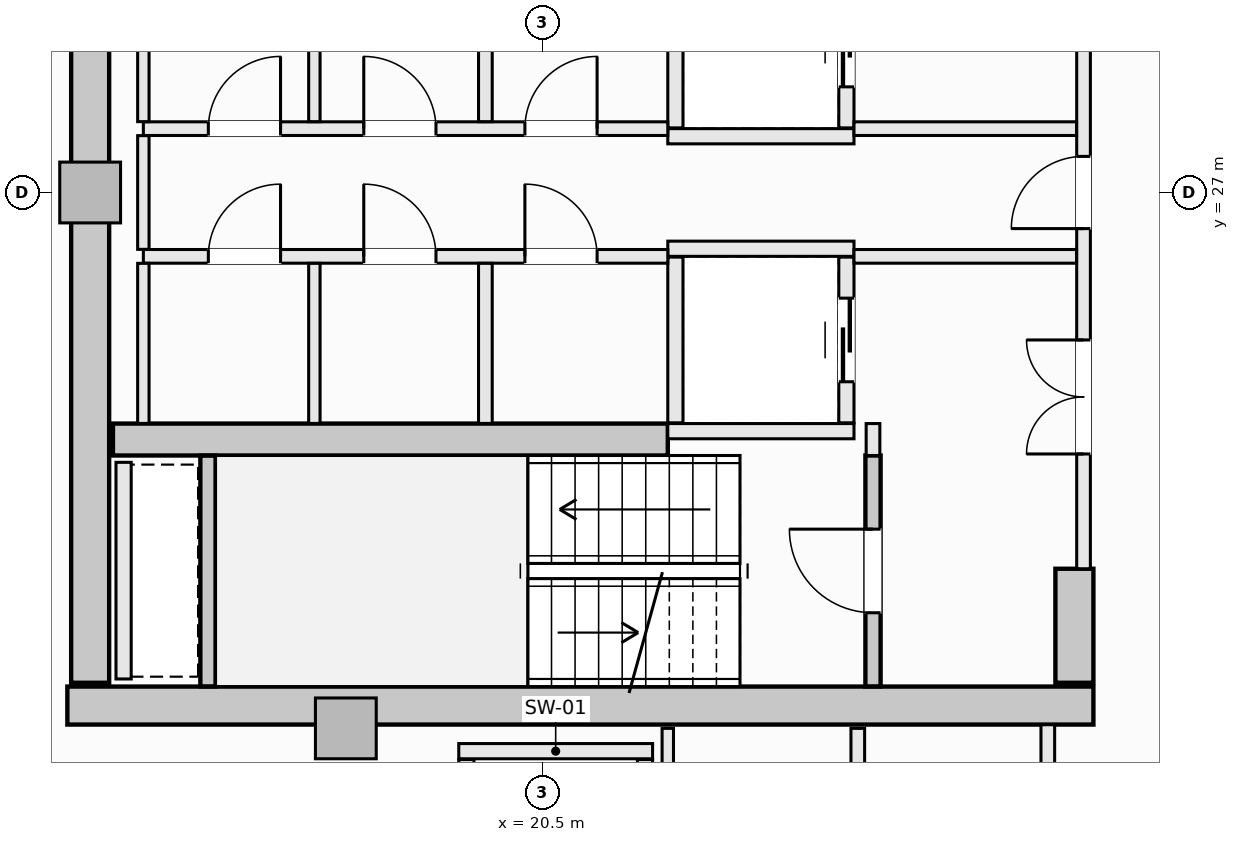
"""IFC4 building model, lengths in metres.
Left out: names, types, materials, properties, quantities, classifications, styles, units other than length and angle.
Written with IfcOpenShell. Run it as: python <this file> out.ifc"""

import sys

from ifc_helpers import new_model, si_unit, direction, frame, frame_2d, origin, origin_2d, place, context, subcontext, project, spatial, rectangle, extrude, element, fill, save


model = new_model("IFC4")
c1 = context("Model", 3, precision=1e-05, world=origin(), true_north=direction((0.0, 1.0)))
c2 = subcontext(c1, "Body", "Model", "MODEL_VIEW")
j1 = project(units=[si_unit("LENGTHUNIT", "METRE"), si_unit("PLANEANGLEUNIT", "RADIAN")], contexts=[c1])
p1 = place(None, origin())
s1 = spatial("IfcSite", under=j1, at=p1, CompositionType="ELEMENT")
p2 = place(p1, origin())
s2 = spatial("IfcBuilding", under=s1, at=p2, CompositionType="ELEMENT")
p3 = place(p2, frame((0.0, 0.0, 232.7)))
s3 = spatial("IfcBuildingStorey", under=s2, at=p3, CompositionType="ELEMENT", Elevation=232.7)
p4 = place(p3, frame((14.25, 20.25, -0.27), z_axis=(0.0, 0.0, 1.0), x_axis=(1.0, 0.0, 0.0)))
e1 = element("IfcWall", 1, at=p4, inside=s3, PredefinedType="SHEAR", context=c2, shape_type="SweptSolid", body=[
    extrude(rectangle(XDim=13.5, YDim=0.5, at=frame_2d((6.75, 0.0))), origin(), (0.0, 0.0, 1.0), 3.3),
])
p5 = place(p3, frame((14.55, 20.55, -0.27), z_axis=(0.0, 0.0, 1.0), x_axis=(0.0, 1.0, 0.0)))
e2 = element("IfcWall", 2, at=p5, inside=s3, PredefinedType="SHEAR", context=c2, shape_type="SweptSolid", body=[
    extrude(rectangle(XDim=12.9, YDim=0.5, at=frame_2d((6.45, 0.0))), origin(), (0.0, 0.0, 1.0), 3.3),
])
p6 = place(p3, frame((27.5, 20.55, -0.27), z_axis=(0.0, 0.0, 1.0), x_axis=(0.0, 1.0, 0.0)))
e3 = element("IfcWall", 3, at=p6, inside=s3, PredefinedType="SHEAR", context=c2, shape_type="SweptSolid", body=[
    extrude(rectangle(XDim=1.5, YDim=0.5, at=frame_2d((0.75, 0.0))), origin(), (0.0, 0.0, 1.0), 3.3),
])
p7 = place(p3, frame((14.85, 23.75, -0.27), z_axis=(0.0, 0.0, 1.0), x_axis=(1.0, 0.0, 0.0)))
e4 = element("IfcWall", 4, at=p7, inside=s3, PredefinedType="SHEAR", context=c2, shape_type="SweptSolid", body=[
    extrude(rectangle(XDim=7.3, YDim=0.42, at=frame_2d((3.65, 0.0))), origin(), (0.0, 0.0, 1.0), 3.3),
])
for number, where, z_axis, x_axis in (
    (5, (14.55, 27.0, -0.27), (0.0, 0.0, 1.0), (1.0, 0.0, 0.0)),
    (6, (17.914, 19.95, -0.27), (0.0, 0.0, 1.0), (1.0, 0.0, 0.0)),
):
    element("IfcColumn", number, at=place(p3, frame(where, z_axis=z_axis, x_axis=x_axis)), inside=s3, PredefinedType="PILASTER", context=c2, shape_type="SweptSolid", body=[
        extrude(rectangle(XDim=0.8, YDim=0.8, at=origin_2d()), origin(), (0.0, 0.0, 1.0), 3.3),
    ])
p8 = place(p3, frame((24.85, 20.502, -0.27), z_axis=(0.0, 0.0, 1.0), x_axis=(0.0, 1.0, 0.0)))
e7 = element("IfcWall", 7, at=p8, inside=s3, PredefinedType="SHEAR", context=c2, shape_type="SweptSolid", body=[
    extrude(rectangle(XDim=3.038, YDim=0.2, at=frame_2d((1.519, 0.0))), origin(), (0.0, 0.0, 1.0), 3.3),
])
p9 = place(p8, frame((0.969, 0.0, 0.27)))
e8 = element("IfcOpeningElement", 8, at=p9, cuts=e7, PredefinedType="OPENING", context=c2, shape_type="SweptSolid", body=[
    extrude(rectangle(XDim=1.1, YDim=2.15, at=frame_2d((0.55, 1.075))), frame((0.0, 0.11, 0.0), z_axis=(0.0, -1.0, 0.0), x_axis=(1.0, 0.0, 0.0)), (0.0, 0.0, 1.0), 0.22),
])
p10 = place(p3, frame((16.1, 20.502, -0.27), z_axis=(0.0, 0.0, 1.0), x_axis=(0.0, 1.0, 0.0)))
e9 = element("IfcWall", 9, at=p10, inside=s3, PredefinedType="SHEAR", context=c2, shape_type="SweptSolid", body=[
    extrude(rectangle(XDim=3.036, YDim=0.2, at=frame_2d((1.518, 0.0))), origin(), (0.0, 0.0, 1.0), 3.3),
])
p11 = place(p3, frame((22.15, 27.74, 0.0), z_axis=(0.0, 0.0, 1.0), x_axis=(1.0, 0.0, 0.0)))
e10 = element("IfcWall", 10, at=p11, inside=s3, PredefinedType="SOLIDWALL", context=c2, shape_type="SweptSolid", body=[
    extrude(rectangle(XDim=2.45, YDim=0.2, at=frame_2d((1.225, 0.0))), origin(), (0.0, 0.0, 1.0), 3.03),
])
p12 = place(p3, frame((22.25, 27.85, 0.0), z_axis=(0.0, 0.0, 1.0), x_axis=(0.0, 1.0, 0.0)))
e11 = element("IfcWall", 11, at=p12, inside=s3, PredefinedType="SOLIDWALL", context=c2, shape_type="SweptSolid", body=[
    extrude(rectangle(XDim=2.18, YDim=0.2, at=frame_2d((1.09, 0.0))), origin(), (0.0, 0.0, 1.0), 3.03),
])
p13 = place(p3, frame((24.5, 27.85, 0.0), z_axis=(0.0, 0.0, 1.0), x_axis=(0.0, 1.0, 0.0)))
e12 = element("IfcWall", 12, at=p13, inside=s3, PredefinedType="SOLIDWALL", context=c2, shape_type="SweptSolid", body=[
    extrude(rectangle(XDim=2.18, YDim=0.2, at=frame_2d((1.09, 0.0))), origin(), (0.0, 0.0, 1.0), 3.03),
])
p14 = place(p13, frame((0.54, 0.0, 0.0)))
e13 = element("IfcOpeningElement", 13, at=p14, cuts=e12, PredefinedType="OPENING", context=c2, shape_type="SweptSolid", body=[
    extrude(rectangle(XDim=1.1, YDim=2.2, at=frame_2d((0.55, 1.1))), frame((0.0, 0.11, 0.0), z_axis=(0.0, -1.0, 0.0), x_axis=(1.0, 0.0, 0.0)), (0.0, 0.0, 1.0), 0.22),
])
for number, where, z_axis, x_axis in (
    (14, (22.15, 26.26, 0.0), (0.0, 0.0, 1.0), (1.0, 0.0, 0.0)),
    (15, (22.15, 23.86, 0.0), (0.0, 0.0, 1.0), (1.0, 0.0, 0.0)),
):
    element("IfcWall", number, at=place(p3, frame(where, z_axis=z_axis, x_axis=x_axis)), inside=s3, PredefinedType="SOLIDWALL", context=c2, shape_type="SweptSolid", body=[
        extrude(rectangle(XDim=2.45, YDim=0.2, at=frame_2d((1.225, 0.0))), origin(), (0.0, 0.0, 1.0), 3.03),
    ])
p15 = place(p3, frame((22.25, 23.97, 0.0), z_axis=(0.0, 0.0, 1.0), x_axis=(0.0, 1.0, 0.0)))
e16 = element("IfcWall", 16, at=p15, inside=s3, PredefinedType="SOLIDWALL", context=c2, shape_type="SweptSolid", body=[
    extrude(rectangle(XDim=2.18, YDim=0.2, at=frame_2d((1.09, 0.0))), origin(), (0.0, 0.0, 1.0), 3.03),
])
p16 = place(p3, frame((24.5, 23.97, 0.0), z_axis=(0.0, 0.0, 1.0), x_axis=(0.0, 1.0, 0.0)))
e17 = element("IfcWall", 17, at=p16, inside=s3, PredefinedType="SOLIDWALL", context=c2, shape_type="SweptSolid", body=[
    extrude(rectangle(XDim=2.18, YDim=0.2, at=frame_2d((1.09, 0.0))), origin(), (0.0, 0.0, 1.0), 3.03),
])
p17 = place(p16, frame((0.54, 0.0, 0.0)))
e18 = element("IfcOpeningElement", 18, at=p17, cuts=e17, PredefinedType="OPENING", context=c2, shape_type="SweptSolid", body=[
    extrude(rectangle(XDim=1.1, YDim=2.2, at=frame_2d((0.55, 1.1))), frame((0.0, 0.11, 0.0), z_axis=(0.0, -1.0, 0.0), x_axis=(1.0, 0.0, 0.0)), (0.0, 0.0, 1.0), 0.22),
])
p18 = place(p3, frame((19.4, 19.65, 0.0), z_axis=(0.0, 0.0, 1.0), x_axis=(1.0, 0.0, 0.0)))
e19 = element("IfcWall", 19, at=p18, inside=s3, PredefinedType="SOLIDWALL", context=c2, shape_type="SweptSolid", body=[
    extrude(rectangle(XDim=2.55, YDim=0.2, at=frame_2d((1.275, 0.0))), origin(), (0.0, 0.0, 1.0), 3.03),
])
for number, where, z_axis, x_axis in (
    (20, (19.5, 17.01, 0.0), (0.0, 0.0, 1.0), (0.0, 1.0, 0.0)),
    (21, (21.85, 17.01, 0.0), (0.0, 0.0, 1.0), (0.0, 1.0, 0.0)),
):
    element("IfcWall", number, at=place(p3, frame(where, z_axis=z_axis, x_axis=x_axis)), inside=s3, PredefinedType="SOLIDWALL", context=c2, shape_type="SweptSolid", body=[
        extrude(rectangle(XDim=2.53, YDim=0.2, at=frame_2d((1.265, 0.0))), origin(), (0.0, 0.0, 1.0), 3.03),
    ])
p19 = place(p3, frame((14.99, 20.6, 0.0), z_axis=(0.0, 0.0, 1.0), x_axis=(0.0, 1.0, 0.0)))
e22 = element("IfcWall", 22, at=p19, inside=s3, PredefinedType="SOLIDWALL", context=c2, shape_type="SweptSolid", body=[
    extrude(rectangle(XDim=2.85, YDim=0.2, at=frame_2d((1.425, 0.0))), origin(), (0.0, 0.0, 1.0), 3.03),
])
p20 = place(p3, frame((24.85, 23.54, 0.0), z_axis=(0.0, 0.0, 1.0), x_axis=(0.0, 1.0, 0.0)))
e23 = element("IfcWall", 23, at=p20, inside=s3, PredefinedType="SOLIDWALL", context=c2, shape_type="SweptSolid", body=[
    extrude(rectangle(XDim=0.42, YDim=0.18, at=frame_2d((0.21, 0.0))), origin(), (0.0, 0.0, 1.0), 3.03),
])
p21 = place(p3, frame((27.62, 22.05, 0.0), z_axis=(0.0, 0.0, 1.0), x_axis=(0.0, 1.0, 0.0)))
e24 = element("IfcWall", 24, at=p21, inside=s3, PredefinedType="SOLIDWALL", context=c2, shape_type="SweptSolid", body=[
    extrude(rectangle(XDim=9.9, YDim=0.18, at=frame_2d((4.95, 0.0))), origin(), (0.0, 0.0, 1.0), 3.03),
])
p22 = place(p21, frame((4.475, 0.0, 0.0)))
e25 = element("IfcOpeningElement", 25, at=p22, cuts=e24, PredefinedType="OPENING", context=c2, shape_type="SweptSolid", body=[
    extrude(rectangle(XDim=0.95, YDim=2.1, at=frame_2d((0.475, 1.05))), frame((0.0, 0.1, 0.0), z_axis=(0.0, -1.0, 0.0), x_axis=(1.0, 0.0, 0.0)), (0.0, 0.0, 1.0), 0.2),
])
p23 = place(p21, frame((6.89, 0.0, 0.0)))
e26 = element("IfcOpeningElement", 26, at=p23, cuts=e24, PredefinedType="OPENING", context=c2, shape_type="SweptSolid", body=[
    extrude(rectangle(XDim=1.5, YDim=2.2, at=frame_2d((0.75, 1.1))), frame((0.0, 0.1, 0.0), z_axis=(0.0, -1.0, 0.0), x_axis=(1.0, 0.0, 0.0)), (0.0, 0.0, 1.0), 0.2),
])
p24 = place(p21, frame((1.51, 0.0, 0.0)))
e27 = element("IfcOpeningElement", 27, at=p24, cuts=e24, PredefinedType="OPENING", context=c2, shape_type="SweptSolid", body=[
    extrude(rectangle(XDim=1.5, YDim=2.2, at=frame_2d((0.75, 1.1))), frame((0.0, 0.1, 0.0), z_axis=(0.0, -1.0, 0.0), x_axis=(1.0, 0.0, 0.0)), (0.0, 0.0, 1.0), 0.2),
])
p25 = place(p3, frame((15.25, 27.84, 0.0), z_axis=(0.0, 0.0, 1.0), x_axis=(1.0, 0.0, 0.0)))
e28 = element("IfcWall", 28, at=p25, inside=s3, PredefinedType="SOLIDWALL", context=c2, shape_type="SweptSolid", body=[
    extrude(rectangle(XDim=6.9, YDim=0.18, at=frame_2d((3.45, 0.0))), origin(), (0.0, 0.0, 1.0), 3.03),
])
p26 = place(p25, frame((5.02, 0.0, 0.0)))
e29 = element("IfcOpeningElement", 29, at=p26, cuts=e28, PredefinedType="OPENING", context=c2, shape_type="SweptSolid", body=[
    extrude(rectangle(XDim=0.95, YDim=2.1, at=frame_2d((0.475, 1.05))), frame((0.0, 0.1, 0.0), z_axis=(0.0, -1.0, 0.0), x_axis=(1.0, 0.0, 0.0)), (0.0, 0.0, 1.0), 0.2),
])
p27 = place(p25, frame((0.855, 0.0, 0.0)))
e30 = element("IfcOpeningElement", 30, at=p27, cuts=e28, PredefinedType="OPENING", context=c2, shape_type="SweptSolid", body=[
    extrude(rectangle(XDim=0.95, YDim=2.1, at=frame_2d((0.475, 1.05))), frame((0.0, 0.1, 0.0), z_axis=(0.0, -1.0, 0.0), x_axis=(1.0, 0.0, 0.0)), (0.0, 0.0, 1.0), 0.2),
])
p28 = place(p25, frame((2.9, 0.0, 0.0)))
e31 = element("IfcOpeningElement", 31, at=p28, cuts=e28, PredefinedType="OPENING", context=c2, shape_type="SweptSolid", body=[
    extrude(rectangle(XDim=0.95, YDim=2.1, at=frame_2d((0.475, 1.05))), frame((0.0, 0.1, 0.0), z_axis=(0.0, -1.0, 0.0), x_axis=(1.0, 0.0, 0.0)), (0.0, 0.0, 1.0), 0.2),
])
p29 = place(p3, frame((24.6, 27.84, 0.0), z_axis=(0.0, 0.0, 1.0), x_axis=(1.0, 0.0, 0.0)))
e32 = element("IfcWall", 32, at=p29, inside=s3, PredefinedType="SOLIDWALL", context=c2, shape_type="SweptSolid", body=[
    extrude(rectangle(XDim=2.928, YDim=0.18, at=frame_2d((1.464, 0.0))), origin(), (0.0, 0.0, 1.0), 3.03),
])
p30 = place(p3, frame((15.25, 26.16, 0.0), z_axis=(0.0, 0.0, 1.0), x_axis=(1.0, 0.0, 0.0)))
e33 = element("IfcWall", 33, at=p30, inside=s3, PredefinedType="SOLIDWALL", context=c2, shape_type="SweptSolid", body=[
    extrude(rectangle(XDim=6.9, YDim=0.18, at=frame_2d((3.45, 0.0))), origin(), (0.0, 0.0, 1.0), 3.03),
])
p31 = place(p30, frame((5.02, 0.0, 0.0)))
e34 = element("IfcOpeningElement", 34, at=p31, cuts=e33, PredefinedType="OPENING", context=c2, shape_type="SweptSolid", body=[
    extrude(rectangle(XDim=0.95, YDim=2.1, at=frame_2d((0.475, 1.05))), frame((0.0, 0.1, 0.0), z_axis=(0.0, -1.0, 0.0), x_axis=(1.0, 0.0, 0.0)), (0.0, 0.0, 1.0), 0.2),
])
p32 = place(p30, frame((0.855, 0.0, 0.0)))
e35 = element("IfcOpeningElement", 35, at=p32, cuts=e33, PredefinedType="OPENING", context=c2, shape_type="SweptSolid", body=[
    extrude(rectangle(XDim=0.95, YDim=2.1, at=frame_2d((0.475, 1.05))), frame((0.0, 0.1, 0.0), z_axis=(0.0, -1.0, 0.0), x_axis=(1.0, 0.0, 0.0)), (0.0, 0.0, 1.0), 0.2),
])
p33 = place(p30, frame((2.9, 0.0, 0.0)))
e36 = element("IfcOpeningElement", 36, at=p33, cuts=e33, PredefinedType="OPENING", context=c2, shape_type="SweptSolid", body=[
    extrude(rectangle(XDim=0.95, YDim=2.1, at=frame_2d((0.475, 1.05))), frame((0.0, 0.1, 0.0), z_axis=(0.0, -1.0, 0.0), x_axis=(1.0, 0.0, 0.0)), (0.0, 0.0, 1.0), 0.2),
])
p34 = place(p3, frame((24.6, 26.16, 0.0), z_axis=(0.0, 0.0, 1.0), x_axis=(1.0, 0.0, 0.0)))
e37 = element("IfcWall", 37, at=p34, inside=s3, PredefinedType="SOLIDWALL", context=c2, shape_type="SweptSolid", body=[
    extrude(rectangle(XDim=2.928, YDim=0.18, at=frame_2d((1.464, 0.0))), origin(), (0.0, 0.0, 1.0), 3.03),
])
p35 = place(p3, frame((15.25, 23.962, 0.0), z_axis=(0.0, 0.0, 1.0), x_axis=(0.0, 1.0, 0.0)))
e38 = element("IfcWall", 38, at=p35, inside=s3, PredefinedType="PARTITIONING", context=c2, shape_type="SweptSolid", body=[
    extrude(rectangle(XDim=2.106, YDim=0.15, at=frame_2d((1.053, 0.0))), origin(), (0.0, 0.0, 1.0), 3.03),
])
p36 = place(p3, frame((15.25, 26.252, 0.0), z_axis=(0.0, 0.0, 1.0), x_axis=(0.0, 1.0, 0.0)))
e39 = element("IfcWall", 39, at=p36, inside=s3, PredefinedType="PARTITIONING", context=c2, shape_type="SweptSolid", body=[
    extrude(rectangle(XDim=1.496, YDim=0.15, at=frame_2d((0.748, 0.0))), origin(), (0.0, 0.0, 1.0), 3.03),
])
p37 = place(p3, frame((15.25, 27.932, 0.0), z_axis=(0.0, 0.0, 1.0), x_axis=(0.0, 1.0, 0.0)))
e40 = element("IfcWall", 40, at=p37, inside=s3, PredefinedType="PARTITIONING", context=c2, shape_type="SweptSolid", body=[
    extrude(rectangle(XDim=2.106, YDim=0.15, at=frame_2d((1.053, 0.0))), origin(), (0.0, 0.0, 1.0), 3.03),
])
for number, where, z_axis, x_axis in (
    (41, (19.75, 23.962, 0.0), (0.0, 0.0, 1.0), (0.0, 1.0, 0.0)),
    (42, (19.75, 27.932, 0.0), (0.0, 0.0, 1.0), (0.0, 1.0, 0.0)),
):
    element("IfcWall", number, at=place(p3, frame(where, z_axis=z_axis, x_axis=x_axis)), inside=s3, PredefinedType="SOLIDWALL", context=c2, shape_type="SweptSolid", body=[
        extrude(rectangle(XDim=2.106, YDim=0.18, at=frame_2d((1.053, 0.0))), origin(), (0.0, 0.0, 1.0), 3.03),
    ])
for number, where, z_axis, x_axis in (
    (43, (17.5, 23.962, 0.0), (0.0, 0.0, 1.0), (0.0, 1.0, 0.0)),
    (44, (17.5, 27.932, 0.0), (0.0, 0.0, 1.0), (0.0, 1.0, 0.0)),
):
    element("IfcWall", number, at=place(p3, frame(where, z_axis=z_axis, x_axis=x_axis)), inside=s3, PredefinedType="PARTITIONING", context=c2, shape_type="SweptSolid", body=[
        extrude(rectangle(XDim=2.106, YDim=0.15, at=frame_2d((1.053, 0.0))), origin(), (0.0, 0.0, 1.0), 3.03),
    ])
p38 = place(p3, frame((22.15, 17.142, 0.0), z_axis=(0.0, 0.0, 1.0), x_axis=(0.0, 1.0, 0.0)))
e45 = element("IfcWall", 45, at=p38, inside=s3, PredefinedType="PARTITIONING", context=c2, shape_type="SweptSolid", body=[
    extrude(rectangle(XDim=2.808, YDim=0.15, at=frame_2d((1.404, 0.0))), origin(), (0.0, 0.0, 1.0), 3.03),
])
p39 = place(p3, frame((24.65, 17.142, 0.0), z_axis=(0.0, 0.0, 1.0), x_axis=(0.0, 1.0, 0.0)))
e46 = element("IfcWall", 46, at=p39, inside=s3, PredefinedType="SOLIDWALL", context=c2, shape_type="SweptSolid", body=[
    extrude(rectangle(XDim=2.808, YDim=0.18, at=frame_2d((1.404, 0.0))), origin(), (0.0, 0.0, 1.0), 3.03),
])
p40 = place(p39, frame((0.929, 0.0, 0.0)))
e47 = element("IfcOpeningElement", 47, at=p40, cuts=e46, PredefinedType="OPENING", context=c2, shape_type="SweptSolid", body=[
    extrude(rectangle(XDim=0.95, YDim=2.1, at=frame_2d((0.475, 1.05))), frame((0.0, 0.1, 0.0), z_axis=(0.0, -1.0, 0.0), x_axis=(1.0, 0.0, 0.0)), (0.0, 0.0, 1.0), 0.2),
])
p41 = place(p3, frame((27.15, 17.142, 0.0), z_axis=(0.0, 0.0, 1.0), x_axis=(0.0, 1.0, 0.0)))
e48 = element("IfcWall", 48, at=p41, inside=s3, PredefinedType="SOLIDWALL", context=c2, shape_type="SweptSolid", body=[
    extrude(rectangle(XDim=2.856, YDim=0.18, at=frame_2d((1.428, 0.0))), origin(), (0.0, 0.0, 1.0), 3.03),
])
p42 = place(p41, frame((0.953, 0.0, 0.0)))
e49 = element("IfcOpeningElement", 49, at=p42, cuts=e48, PredefinedType="OPENING", context=c2, shape_type="SweptSolid", body=[
    extrude(rectangle(XDim=0.95, YDim=2.1, at=frame_2d((0.475, 1.05))), frame((0.0, 0.1, 0.0), z_axis=(0.0, -1.0, 0.0), x_axis=(1.0, 0.0, 0.0)), (0.0, 0.0, 1.0), 0.2),
])
p43 = place(p9, origin())
e50 = element("IfcDoor", 50, at=p43, inside=s3, OperationType="SINGLE_SWING_RIGHT", PredefinedType="DOOR", context=c2, shape_type="SweptSolid", body=[
    extrude(rectangle(XDim=1.1, YDim=2.15, at=frame_2d((0.55, 1.075))), frame((0.0, 0.025, 0.0), z_axis=(0.0, -1.0, 0.0), x_axis=(1.0, 0.0, 0.0)), (0.0, 0.0, 1.0), 0.05),
])
fill(e8, e50)
p44 = place(p14, origin())
e51 = element("IfcDoor", 51, at=p44, inside=s3, OperationType="SLIDING_TO_LEFT", PredefinedType="DOOR", context=c2, shape_type="SweptSolid", body=[
    extrude(rectangle(XDim=1.1, YDim=2.2, at=frame_2d((0.55, 1.1))), frame((0.0, 0.025, 0.0), z_axis=(0.0, -1.0, 0.0), x_axis=(1.0, 0.0, 0.0)), (0.0, 0.0, 1.0), 0.05),
])
fill(e13, e51)
p45 = place(p17, origin())
e52 = element("IfcDoor", 52, at=p45, inside=s3, OperationType="SLIDING_TO_LEFT", PredefinedType="DOOR", context=c2, shape_type="SweptSolid", body=[
    extrude(rectangle(XDim=1.1, YDim=2.2, at=frame_2d((0.55, 1.1))), frame((0.0, 0.025, 0.0), z_axis=(0.0, -1.0, 0.0), x_axis=(1.0, 0.0, 0.0)), (0.0, 0.0, 1.0), 0.05),
])
fill(e18, e52)
p46 = place(p22, origin())
e53 = element("IfcDoor", 53, at=p46, inside=s3, OperationType="SINGLE_SWING_LEFT", PredefinedType="DOOR", context=c2, shape_type="SweptSolid", body=[
    extrude(rectangle(XDim=0.95, YDim=2.1, at=frame_2d((0.475, 1.05))), frame((0.0, 0.025, 0.0), z_axis=(0.0, -1.0, 0.0), x_axis=(1.0, 0.0, 0.0)), (0.0, 0.0, 1.0), 0.05),
])
fill(e25, e53)
p47 = place(p24, origin())
e54 = element("IfcDoor", 54, at=p47, inside=s3, OperationType="DOUBLE_DOOR_SINGLE_SWING", PredefinedType="DOOR", context=c2, shape_type="SweptSolid", body=[
    extrude(rectangle(XDim=1.5, YDim=2.2, at=frame_2d((0.75, 1.1))), frame((0.0, 0.025, 0.0), z_axis=(0.0, -1.0, 0.0), x_axis=(1.0, 0.0, 0.0)), (0.0, 0.0, 1.0), 0.05),
])
fill(e27, e54)
p48 = place(p26, origin())
e55 = element("IfcDoor", 55, at=p48, inside=s3, OperationType="SINGLE_SWING_RIGHT", PredefinedType="DOOR", context=c2, shape_type="SweptSolid", body=[
    extrude(rectangle(XDim=0.95, YDim=2.1, at=frame_2d((0.475, 1.05))), frame((0.0, 0.025, 0.0), z_axis=(0.0, -1.0, 0.0), x_axis=(1.0, 0.0, 0.0)), (0.0, 0.0, 1.0), 0.05),
])
fill(e29, e55)
p49 = place(p31, origin())
e56 = element("IfcDoor", 56, at=p49, inside=s3, OperationType="SINGLE_SWING_LEFT", PredefinedType="DOOR", context=c2, shape_type="SweptSolid", body=[
    extrude(rectangle(XDim=0.95, YDim=2.1, at=frame_2d((0.475, 1.05))), frame((0.0, 0.025, 0.0), z_axis=(0.0, -1.0, 0.0), x_axis=(1.0, 0.0, 0.0)), (0.0, 0.0, 1.0), 0.05),
])
fill(e34, e56)
p50 = place(p27, origin())
e57 = element("IfcDoor", 57, at=p50, inside=s3, OperationType="SINGLE_SWING_RIGHT", PredefinedType="DOOR", context=c2, shape_type="SweptSolid", body=[
    extrude(rectangle(XDim=0.95, YDim=2.1, at=frame_2d((0.475, 1.05))), frame((0.0, 0.025, 0.0), z_axis=(0.0, -1.0, 0.0), x_axis=(1.0, 0.0, 0.0)), (0.0, 0.0, 1.0), 0.05),
])
fill(e30, e57)
p51 = place(p28, origin())
e58 = element("IfcDoor", 58, at=p51, inside=s3, OperationType="SINGLE_SWING_LEFT", PredefinedType="DOOR", context=c2, shape_type="SweptSolid", body=[
    extrude(rectangle(XDim=0.95, YDim=2.1, at=frame_2d((0.475, 1.05))), frame((0.0, 0.025, 0.0), z_axis=(0.0, -1.0, 0.0), x_axis=(1.0, 0.0, 0.0)), (0.0, 0.0, 1.0), 0.05),
])
fill(e31, e58)
p52 = place(p32, origin())
e59 = element("IfcDoor", 59, at=p52, inside=s3, OperationType="SINGLE_SWING_RIGHT", PredefinedType="DOOR", context=c2, shape_type="SweptSolid", body=[
    extrude(rectangle(XDim=0.95, YDim=2.1, at=frame_2d((0.475, 1.05))), frame((0.0, 0.025, 0.0), z_axis=(0.0, -1.0, 0.0), x_axis=(1.0, 0.0, 0.0)), (0.0, 0.0, 1.0), 0.05),
])
fill(e35, e59)
p53 = place(p33, origin())
e60 = element("IfcDoor", 60, at=p53, inside=s3, OperationType="SINGLE_SWING_LEFT", PredefinedType="DOOR", context=c2, shape_type="SweptSolid", body=[
    extrude(rectangle(XDim=0.95, YDim=2.1, at=frame_2d((0.475, 1.05))), frame((0.0, 0.025, 0.0), z_axis=(0.0, -1.0, 0.0), x_axis=(1.0, 0.0, 0.0)), (0.0, 0.0, 1.0), 0.05),
])
fill(e36, e60)
save(model, sys.argv[1])
